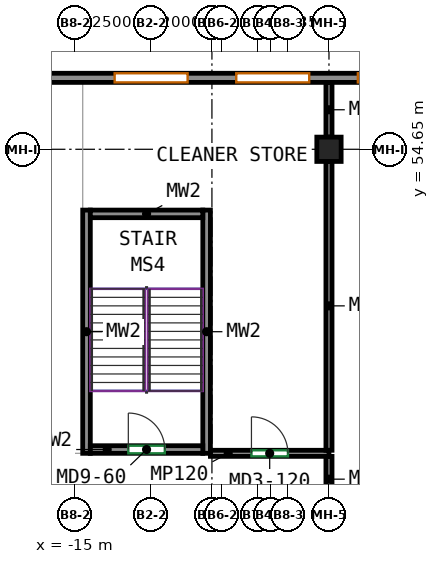
"""IFC4 building model, lengths in metres.
Left out: names, types, materials, properties, quantities, classifications, styles, units other than length and angle.
Written with IfcOpenShell. Run it as: python <this file> out.ifc"""

import sys

from ifc_helpers import new_model, si_unit, direction, frame, frame_2d, origin, origin_2d, place, context, subcontext, project, spatial, rectangle, extrude, source, transform, mapped, element, fill, save


model = new_model("IFC4")
c1 = context("Model", 3, precision=1e-05, world=origin(), true_north=direction((0.0, 1.0)))
c2 = subcontext(c1, "Body", "Model", "MODEL_VIEW")
j1 = project(units=[si_unit("LENGTHUNIT", "METRE"), si_unit("PLANEANGLEUNIT", "RADIAN")], contexts=[c1])
p1 = place(None, origin())
s1 = spatial("IfcSite", under=j1, at=p1, CompositionType="ELEMENT")
p2 = place(p1, origin())
s2 = spatial("IfcBuilding", under=s1, at=p2, CompositionType="ELEMENT")
p3 = place(p2, frame((0.0, 0.0, 13.5)))
s3 = spatial("IfcBuildingStorey", under=s2, at=p3, CompositionType="ELEMENT", Elevation=13.5)
m1 = source(origin(), c2, "Body", "SweptSolid", [
    extrude(rectangle(XDim=0.8, YDim=0.8, at=origin_2d()), origin(), (0.0, 0.0, 1.0), 4.1),
])
p4 = place(p3, frame((-6.65, 54.65, 0.0), z_axis=(0.0, 0.0, 1.0), x_axis=(1.0, 0.0, 0.0)))
e1 = element("IfcColumn", 1, at=p4, inside=s3, PredefinedType="COLUMN", context=c2, shape_type="MappedRepresentation", body=[
    mapped(m1, transform((0.0, 0.0, 0.0))),
])
m2 = source(origin(), c2, "Body", "SweptSolid", [
    extrude(rectangle(XDim=8.0, YDim=0.25, at=frame_2d((4.0, 0.0))), origin(), (0.0, 0.0, 1.0), 4.1),
])
for number, where, z_axis, x_axis in (
    (2, (-14.625, 44.65, 0.0), (0.0, 0.0, 1.0), (0.0, 1.0, 0.0)),
    (3, (-10.675, 44.65, 0.0), (0.0, 0.0, 1.0), (0.0, 1.0, 0.0)),
):
    element("IfcWall", number, at=place(p3, frame(where, z_axis=z_axis, x_axis=x_axis)), inside=s3, PredefinedType="SHEAR", context=c2, shape_type="MappedRepresentation", body=[
        mapped(m2, transform((0.0, 0.0, 0.0))),
    ])
m3 = source(origin(), c2, "Body", "SweptSolid", [
    extrude(rectangle(XDim=3.7, YDim=0.25, at=frame_2d((1.85, 0.0))), origin(), (0.0, 0.0, 1.0), 4.1),
])
p5 = place(p3, frame((-14.5, 44.775, 0.0), z_axis=(0.0, 0.0, 1.0), x_axis=(1.0, 0.0, 0.0)))
e4 = element("IfcWall", 4, at=p5, inside=s3, PredefinedType="SHEAR", context=c2, shape_type="MappedRepresentation", body=[
    mapped(m3, transform((0.0, 0.0, 0.0))),
])
p6 = place(p5, frame((1.25, 0.0, 0.0)))
e5 = element("IfcOpeningElement", 5, at=p6, cuts=e4, PredefinedType="OPENING", context=c2, shape_type="SweptSolid", body=[
    extrude(rectangle(XDim=1.2, YDim=2.1, at=frame_2d((0.6, 1.05))), frame((0.0, 0.135, 0.0), z_axis=(0.0, -1.0, 0.0), x_axis=(1.0, 0.0, 0.0)), (0.0, 0.0, 1.0), 0.27),
])
p7 = place(p3, frame((-14.5, 52.525, 0.0), z_axis=(0.0, 0.0, 1.0), x_axis=(1.0, 0.0, 0.0)))
e6 = element("IfcWall", 6, at=p7, inside=s3, PredefinedType="SHEAR", context=c2, shape_type="MappedRepresentation", body=[
    mapped(m3, transform((0.0, 0.0, 0.0))),
])
m4 = source(origin(), c2, "Body", "SweptSolid", [
    extrude(rectangle(XDim=112.7, YDim=0.3, at=frame_2d((56.35, 0.0))), origin(), (0.0, 0.0, 1.0), 4.1),
])
p8 = place(p3, frame((-56.85, 57.0, 0.0), z_axis=(0.0, 0.0, 1.0), x_axis=(1.0, 0.0, 0.0)))
e7 = element("IfcWall", 7, at=p8, inside=s3, PredefinedType="SOLIDWALL", context=c2, shape_type="MappedRepresentation", body=[
    mapped(m4, transform((0.0, 0.0, 0.0))),
])
p9 = place(p8, frame((3.15, 0.0, 0.9)))
e8 = element("IfcOpeningElement", 8, at=p9, cuts=e7, PredefinedType="OPENING", context=c2, shape_type="SweptSolid", body=[
    extrude(rectangle(XDim=2.4, YDim=1.8, at=frame_2d((1.2, 0.9))), frame((0.0, 0.16, 0.0), z_axis=(0.0, -1.0, 0.0), x_axis=(1.0, 0.0, 0.0)), (0.0, 0.0, 1.0), 0.32),
])
p10 = place(p8, frame((7.15, 0.0, 0.9)))
e9 = element("IfcOpeningElement", 9, at=p10, cuts=e7, PredefinedType="OPENING", context=c2, shape_type="SweptSolid", body=[
    extrude(rectangle(XDim=2.4, YDim=1.8, at=frame_2d((1.2, 0.9))), frame((0.0, 0.16, 0.0), z_axis=(0.0, -1.0, 0.0), x_axis=(1.0, 0.0, 0.0)), (0.0, 0.0, 1.0), 0.32),
])
p11 = place(p8, frame((11.15, 0.0, 0.9)))
e10 = element("IfcOpeningElement", 10, at=p11, cuts=e7, PredefinedType="OPENING", context=c2, shape_type="SweptSolid", body=[
    extrude(rectangle(XDim=2.4, YDim=1.8, at=frame_2d((1.2, 0.9))), frame((0.0, 0.16, 0.0), z_axis=(0.0, -1.0, 0.0), x_axis=(1.0, 0.0, 0.0)), (0.0, 0.0, 1.0), 0.32),
])
p12 = place(p8, frame((15.15, 0.0, 0.9)))
e11 = element("IfcOpeningElement", 11, at=p12, cuts=e7, PredefinedType="OPENING", context=c2, shape_type="SweptSolid", body=[
    extrude(rectangle(XDim=2.4, YDim=1.8, at=frame_2d((1.2, 0.9))), frame((0.0, 0.16, 0.0), z_axis=(0.0, -1.0, 0.0), x_axis=(1.0, 0.0, 0.0)), (0.0, 0.0, 1.0), 0.32),
])
p13 = place(p8, frame((19.15, 0.0, 0.9)))
e12 = element("IfcOpeningElement", 12, at=p13, cuts=e7, PredefinedType="OPENING", context=c2, shape_type="SweptSolid", body=[
    extrude(rectangle(XDim=2.4, YDim=1.8, at=frame_2d((1.2, 0.9))), frame((0.0, 0.16, 0.0), z_axis=(0.0, -1.0, 0.0), x_axis=(1.0, 0.0, 0.0)), (0.0, 0.0, 1.0), 0.32),
])
p14 = place(p8, frame((23.15, 0.0, 0.9)))
e13 = element("IfcOpeningElement", 13, at=p14, cuts=e7, PredefinedType="OPENING", context=c2, shape_type="SweptSolid", body=[
    extrude(rectangle(XDim=2.4, YDim=1.8, at=frame_2d((1.2, 0.9))), frame((0.0, 0.16, 0.0), z_axis=(0.0, -1.0, 0.0), x_axis=(1.0, 0.0, 0.0)), (0.0, 0.0, 1.0), 0.32),
])
p15 = place(p8, frame((27.15, 0.0, 0.9)))
e14 = element("IfcOpeningElement", 14, at=p15, cuts=e7, PredefinedType="OPENING", context=c2, shape_type="SweptSolid", body=[
    extrude(rectangle(XDim=2.4, YDim=1.8, at=frame_2d((1.2, 0.9))), frame((0.0, 0.16, 0.0), z_axis=(0.0, -1.0, 0.0), x_axis=(1.0, 0.0, 0.0)), (0.0, 0.0, 1.0), 0.32),
])
p16 = place(p8, frame((31.15, 0.0, 0.9)))
e15 = element("IfcOpeningElement", 15, at=p16, cuts=e7, PredefinedType="OPENING", context=c2, shape_type="SweptSolid", body=[
    extrude(rectangle(XDim=2.4, YDim=1.8, at=frame_2d((1.2, 0.9))), frame((0.0, 0.16, 0.0), z_axis=(0.0, -1.0, 0.0), x_axis=(1.0, 0.0, 0.0)), (0.0, 0.0, 1.0), 0.32),
])
p17 = place(p8, frame((35.15, 0.0, 0.9)))
e16 = element("IfcOpeningElement", 16, at=p17, cuts=e7, PredefinedType="OPENING", context=c2, shape_type="SweptSolid", body=[
    extrude(rectangle(XDim=2.4, YDim=1.8, at=frame_2d((1.2, 0.9))), frame((0.0, 0.16, 0.0), z_axis=(0.0, -1.0, 0.0), x_axis=(1.0, 0.0, 0.0)), (0.0, 0.0, 1.0), 0.32),
])
p18 = place(p8, frame((43.15, 0.0, 0.9)))
e17 = element("IfcOpeningElement", 17, at=p18, cuts=e7, PredefinedType="OPENING", context=c2, shape_type="SweptSolid", body=[
    extrude(rectangle(XDim=2.4, YDim=1.8, at=frame_2d((1.2, 0.9))), frame((0.0, 0.16, 0.0), z_axis=(0.0, -1.0, 0.0), x_axis=(1.0, 0.0, 0.0)), (0.0, 0.0, 1.0), 0.32),
])
p19 = place(p8, frame((47.15, 0.0, 0.9)))
e18 = element("IfcOpeningElement", 18, at=p19, cuts=e7, PredefinedType="OPENING", context=c2, shape_type="SweptSolid", body=[
    extrude(rectangle(XDim=2.4, YDim=1.8, at=frame_2d((1.2, 0.9))), frame((0.0, 0.16, 0.0), z_axis=(0.0, -1.0, 0.0), x_axis=(1.0, 0.0, 0.0)), (0.0, 0.0, 1.0), 0.32),
])
p20 = place(p8, frame((51.15, 0.0, 0.9)))
e19 = element("IfcOpeningElement", 19, at=p20, cuts=e7, PredefinedType="OPENING", context=c2, shape_type="SweptSolid", body=[
    extrude(rectangle(XDim=2.4, YDim=1.8, at=frame_2d((1.2, 0.9))), frame((0.0, 0.16, 0.0), z_axis=(0.0, -1.0, 0.0), x_axis=(1.0, 0.0, 0.0)), (0.0, 0.0, 1.0), 0.32),
])
p21 = place(p8, frame((55.15, 0.0, 0.9)))
e20 = element("IfcOpeningElement", 20, at=p21, cuts=e7, PredefinedType="OPENING", context=c2, shape_type="SweptSolid", body=[
    extrude(rectangle(XDim=2.4, YDim=1.8, at=frame_2d((1.2, 0.9))), frame((0.0, 0.16, 0.0), z_axis=(0.0, -1.0, 0.0), x_axis=(1.0, 0.0, 0.0)), (0.0, 0.0, 1.0), 0.32),
])
p22 = place(p8, frame((59.15, 0.0, 0.9)))
e21 = element("IfcOpeningElement", 21, at=p22, cuts=e7, PredefinedType="OPENING", context=c2, shape_type="SweptSolid", body=[
    extrude(rectangle(XDim=2.4, YDim=1.8, at=frame_2d((1.2, 0.9))), frame((0.0, 0.16, 0.0), z_axis=(0.0, -1.0, 0.0), x_axis=(1.0, 0.0, 0.0)), (0.0, 0.0, 1.0), 0.32),
])
p23 = place(p8, frame((63.15, 0.0, 0.9)))
e22 = element("IfcOpeningElement", 22, at=p23, cuts=e7, PredefinedType="OPENING", context=c2, shape_type="SweptSolid", body=[
    extrude(rectangle(XDim=2.4, YDim=1.8, at=frame_2d((1.2, 0.9))), frame((0.0, 0.16, 0.0), z_axis=(0.0, -1.0, 0.0), x_axis=(1.0, 0.0, 0.0)), (0.0, 0.0, 1.0), 0.32),
])
p24 = place(p8, frame((67.15, 0.0, 0.9)))
e23 = element("IfcOpeningElement", 23, at=p24, cuts=e7, PredefinedType="OPENING", context=c2, shape_type="SweptSolid", body=[
    extrude(rectangle(XDim=2.4, YDim=1.8, at=frame_2d((1.2, 0.9))), frame((0.0, 0.16, 0.0), z_axis=(0.0, -1.0, 0.0), x_axis=(1.0, 0.0, 0.0)), (0.0, 0.0, 1.0), 0.32),
])
p25 = place(p8, frame((71.15, 0.0, 0.9)))
e24 = element("IfcOpeningElement", 24, at=p25, cuts=e7, PredefinedType="OPENING", context=c2, shape_type="SweptSolid", body=[
    extrude(rectangle(XDim=2.4, YDim=1.8, at=frame_2d((1.2, 0.9))), frame((0.0, 0.16, 0.0), z_axis=(0.0, -1.0, 0.0), x_axis=(1.0, 0.0, 0.0)), (0.0, 0.0, 1.0), 0.32),
])
p26 = place(p8, frame((75.15, 0.0, 0.9)))
e25 = element("IfcOpeningElement", 25, at=p26, cuts=e7, PredefinedType="OPENING", context=c2, shape_type="SweptSolid", body=[
    extrude(rectangle(XDim=2.4, YDim=1.8, at=frame_2d((1.2, 0.9))), frame((0.0, 0.16, 0.0), z_axis=(0.0, -1.0, 0.0), x_axis=(1.0, 0.0, 0.0)), (0.0, 0.0, 1.0), 0.32),
])
p27 = place(p8, frame((79.15, 0.0, 0.9)))
e26 = element("IfcOpeningElement", 26, at=p27, cuts=e7, PredefinedType="OPENING", context=c2, shape_type="SweptSolid", body=[
    extrude(rectangle(XDim=2.4, YDim=1.8, at=frame_2d((1.2, 0.9))), frame((0.0, 0.16, 0.0), z_axis=(0.0, -1.0, 0.0), x_axis=(1.0, 0.0, 0.0)), (0.0, 0.0, 1.0), 0.32),
])
p28 = place(p8, frame((83.15, 0.0, 0.9)))
e27 = element("IfcOpeningElement", 27, at=p28, cuts=e7, PredefinedType="OPENING", context=c2, shape_type="SweptSolid", body=[
    extrude(rectangle(XDim=2.4, YDim=1.8, at=frame_2d((1.2, 0.9))), frame((0.0, 0.16, 0.0), z_axis=(0.0, -1.0, 0.0), x_axis=(1.0, 0.0, 0.0)), (0.0, 0.0, 1.0), 0.32),
])
p29 = place(p8, frame((87.15, 0.0, 0.9)))
e28 = element("IfcOpeningElement", 28, at=p29, cuts=e7, PredefinedType="OPENING", context=c2, shape_type="SweptSolid", body=[
    extrude(rectangle(XDim=2.4, YDim=1.8, at=frame_2d((1.2, 0.9))), frame((0.0, 0.16, 0.0), z_axis=(0.0, -1.0, 0.0), x_axis=(1.0, 0.0, 0.0)), (0.0, 0.0, 1.0), 0.32),
])
p30 = place(p8, frame((91.15, 0.0, 0.9)))
e29 = element("IfcOpeningElement", 29, at=p30, cuts=e7, PredefinedType="OPENING", context=c2, shape_type="SweptSolid", body=[
    extrude(rectangle(XDim=2.4, YDim=1.8, at=frame_2d((1.2, 0.9))), frame((0.0, 0.16, 0.0), z_axis=(0.0, -1.0, 0.0), x_axis=(1.0, 0.0, 0.0)), (0.0, 0.0, 1.0), 0.32),
])
p31 = place(p8, frame((95.15, 0.0, 0.9)))
e30 = element("IfcOpeningElement", 30, at=p31, cuts=e7, PredefinedType="OPENING", context=c2, shape_type="SweptSolid", body=[
    extrude(rectangle(XDim=2.4, YDim=1.8, at=frame_2d((1.2, 0.9))), frame((0.0, 0.16, 0.0), z_axis=(0.0, -1.0, 0.0), x_axis=(1.0, 0.0, 0.0)), (0.0, 0.0, 1.0), 0.32),
])
p32 = place(p8, frame((103.15, 0.0, 0.9)))
e31 = element("IfcOpeningElement", 31, at=p32, cuts=e7, PredefinedType="OPENING", context=c2, shape_type="SweptSolid", body=[
    extrude(rectangle(XDim=2.4, YDim=1.8, at=frame_2d((1.2, 0.9))), frame((0.0, 0.16, 0.0), z_axis=(0.0, -1.0, 0.0), x_axis=(1.0, 0.0, 0.0)), (0.0, 0.0, 1.0), 0.32),
])
p33 = place(p8, frame((107.15, 0.0, 0.9)))
e32 = element("IfcOpeningElement", 32, at=p33, cuts=e7, PredefinedType="OPENING", context=c2, shape_type="SweptSolid", body=[
    extrude(rectangle(XDim=2.4, YDim=1.8, at=frame_2d((1.2, 0.9))), frame((0.0, 0.16, 0.0), z_axis=(0.0, -1.0, 0.0), x_axis=(1.0, 0.0, 0.0)), (0.0, 0.0, 1.0), 0.32),
])
m5 = source(origin(), c2, "Body", "SweptSolid", [
    extrude(rectangle(XDim=3.9, YDim=0.2, at=frame_2d((1.95, 0.0))), origin(), (0.0, 0.0, 1.0), 3.3),
])
p34 = place(p3, frame((-10.55, 44.65, 0.0), z_axis=(0.0, 0.0, 1.0), x_axis=(1.0, 0.0, 0.0)))
e33 = element("IfcWall", 33, at=p34, inside=s3, PredefinedType="PARTITIONING", context=c2, shape_type="MappedRepresentation", body=[
    mapped(m5, transform((0.0, 0.0, 0.0))),
])
p35 = place(p34, frame((1.35, 0.0, 0.0)))
e34 = element("IfcOpeningElement", 34, at=p35, cuts=e33, PredefinedType="OPENING", context=c2, shape_type="SweptSolid", body=[
    extrude(rectangle(XDim=1.2, YDim=2.1, at=frame_2d((0.6, 1.05))), frame((0.0, 0.11, 0.0), z_axis=(0.0, -1.0, 0.0), x_axis=(1.0, 0.0, 0.0)), (0.0, 0.0, 1.0), 0.22),
])
m6 = source(origin(), c2, "Body", "SweptSolid", [
    extrude(rectangle(XDim=1.5, YDim=0.2, at=frame_2d((0.75, 0.0))), origin(), (0.0, 0.0, 1.0), 3.3),
])
p36 = place(p3, frame((-6.65, 44.55, 0.0), z_axis=(0.0, 0.0, 1.0), x_axis=(0.0, -1.0, 0.0)))
e35 = element("IfcWall", 35, at=p36, inside=s3, PredefinedType="PARTITIONING", context=c2, shape_type="MappedRepresentation", body=[
    mapped(m6, transform((0.0, 0.0, 0.0))),
])
m7 = source(origin(), c2, "Body", "SweptSolid", [
    extrude(rectangle(XDim=9.5, YDim=0.2, at=frame_2d((4.75, 0.0))), origin(), (0.0, 0.0, 1.0), 3.3),
])
p37 = place(p3, frame((-6.65, 54.25, 0.0), z_axis=(0.0, 0.0, 1.0), x_axis=(0.0, -1.0, 0.0)))
e36 = element("IfcWall", 36, at=p37, inside=s3, PredefinedType="PARTITIONING", context=c2, shape_type="MappedRepresentation", body=[
    mapped(m7, transform((0.0, 0.0, 0.0))),
])
m8 = source(origin(), c2, "Body", "SweptSolid", [
    extrude(rectangle(XDim=1.8, YDim=0.2, at=frame_2d((0.9, 0.0))), origin(), (0.0, 0.0, 1.0), 4.1),
])
p38 = place(p3, frame((-6.65, 56.85, 0.0), z_axis=(0.0, 0.0, 1.0), x_axis=(0.0, -1.0, 0.0)))
e37 = element("IfcWall", 37, at=p38, inside=s3, PredefinedType="PARTITIONING", context=c2, shape_type="MappedRepresentation", body=[
    mapped(m8, transform((0.0, 0.0, 0.0))),
])
p39 = place(p18, origin())
e38 = element("IfcWindow", 38, at=p39, inside=s3, PartitioningType="SINGLE_PANEL", PredefinedType="WINDOW", context=c2, shape_type="SweptSolid", body=[
    extrude(rectangle(XDim=2.4, YDim=1.8, at=frame_2d((1.2, 0.9))), frame((0.0, 0.03, 0.0), z_axis=(0.0, -1.0, 0.0), x_axis=(1.0, 0.0, 0.0)), (0.0, 0.0, 1.0), 0.06),
])
fill(e17, e38)
p40 = place(p19, origin())
e39 = element("IfcWindow", 39, at=p40, inside=s3, PartitioningType="SINGLE_PANEL", PredefinedType="WINDOW", context=c2, shape_type="SweptSolid", body=[
    extrude(rectangle(XDim=2.4, YDim=1.8, at=frame_2d((1.2, 0.9))), frame((0.0, 0.03, 0.0), z_axis=(0.0, -1.0, 0.0), x_axis=(1.0, 0.0, 0.0)), (0.0, 0.0, 1.0), 0.06),
])
fill(e18, e39)
p41 = place(p20, origin())
e40 = element("IfcWindow", 40, at=p41, inside=s3, PartitioningType="SINGLE_PANEL", PredefinedType="WINDOW", context=c2, shape_type="SweptSolid", body=[
    extrude(rectangle(XDim=2.4, YDim=1.8, at=frame_2d((1.2, 0.9))), frame((0.0, 0.03, 0.0), z_axis=(0.0, -1.0, 0.0), x_axis=(1.0, 0.0, 0.0)), (0.0, 0.0, 1.0), 0.06),
])
fill(e19, e40)
p42 = place(p6, origin())
e41 = element("IfcDoor", 41, at=p42, inside=s3, OperationType="DOUBLE_DOOR_SINGLE_SWING", PredefinedType="DOOR", context=c2, shape_type="SweptSolid", body=[
    extrude(rectangle(XDim=1.2, YDim=2.1, at=frame_2d((0.6, 1.05))), frame((0.0, 0.025, 0.0), z_axis=(0.0, -1.0, 0.0), x_axis=(1.0, 0.0, 0.0)), (0.0, 0.0, 1.0), 0.05),
])
fill(e5, e41)
p43 = place(p35, origin())
e42 = element("IfcDoor", 42, at=p43, inside=s3, OperationType="SINGLE_SWING_LEFT", PredefinedType="DOOR", context=c2, shape_type="SweptSolid", body=[
    extrude(rectangle(XDim=1.2, YDim=2.1, at=frame_2d((0.6, 1.05))), frame((0.0, 0.025, 0.0), z_axis=(0.0, -1.0, 0.0), x_axis=(1.0, 0.0, 0.0)), (0.0, 0.0, 1.0), 0.05),
])
fill(e34, e42)
save(model, sys.argv[1])
